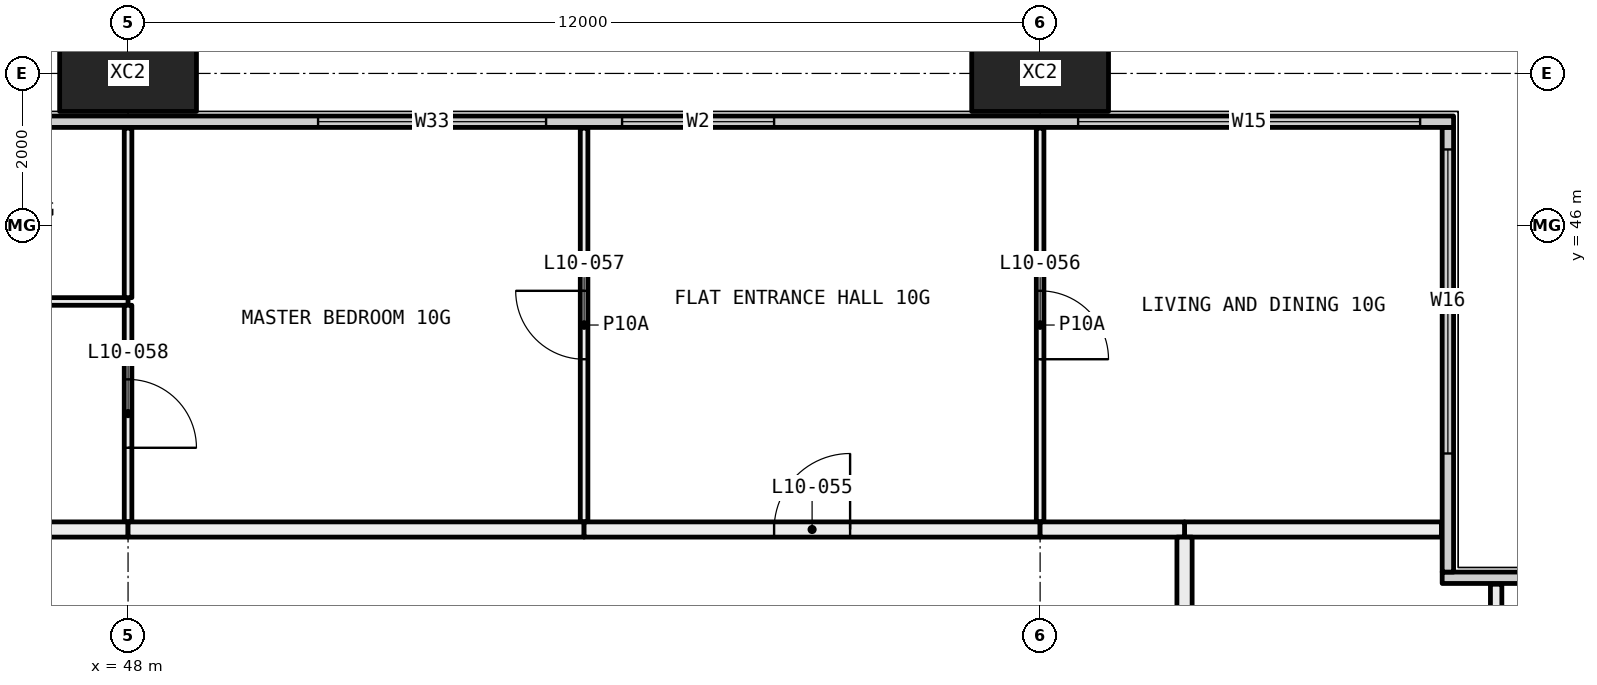
"""IFC4 building model, lengths in metres.
Left out: names, types, materials, properties, quantities, classifications, styles, units other than length and angle.
Written with IfcOpenShell. Run it as: python <this file> out.ifc"""

import sys

from ifc_helpers import new_model, si_unit, direction, frame, frame_2d, origin, origin_2d, place, context, subcontext, project, spatial, rectangle, hollow_rectangle, extrude, element, fill, save


model = new_model("IFC4")
c1 = context("Model", 3, precision=1e-05, world=origin(), true_north=direction((0.0, 1.0)))
c2 = subcontext(c1, "Body", "Model", "MODEL_VIEW")
j1 = project(units=[si_unit("LENGTHUNIT", "METRE"), si_unit("PLANEANGLEUNIT", "RADIAN")], contexts=[c1])
p1 = place(None, origin())
s1 = spatial("IfcSite", under=j1, at=p1, CompositionType="ELEMENT")
p2 = place(p1, origin())
s2 = spatial("IfcBuilding", under=s1, at=p2, CompositionType="ELEMENT")
p3 = place(p2, frame((0.0, 0.0, 47.25)))
s3 = spatial("IfcBuildingStorey", under=s2, at=p3, CompositionType="ELEMENT", Elevation=47.25)
for number, where, z_axis, x_axis in (
    (1, (48.0, 48.0, -0.4), (0.0, 0.0, 1.0), (1.0, 0.0, 0.0)),
    (2, (60.0, 48.0, -0.4), (0.0, 0.0, 1.0), (1.0, 0.0, 0.0)),
):
    element("IfcColumn", number, at=place(p3, frame(where, z_axis=z_axis, x_axis=x_axis)), inside=s3, PredefinedType="COLUMN", context=c2, shape_type="SweptSolid", body=[
        extrude(hollow_rectangle(XDim=1.8, YDim=1.0, WallThickness=0.07, at=origin_2d()), origin(), (0.0, 0.0, 1.0), 3.45),
    ])
p4 = place(p3, frame((65.29, 41.365, 0.0), z_axis=(0.0, 0.0, 1.0), x_axis=(1.0, 0.0, 0.0)))
e3 = element("IfcWall", 3, at=p4, inside=s3, PredefinedType="ELEMENTEDWALL", context=c2, shape_type="SweptSolid", body=[
    extrude(rectangle(XDim=6.15, YDim=0.15, at=frame_2d((3.075, 0.0))), origin(), (0.0, 0.0, 1.0), 3.05),
])
p5 = place(p4, frame((1.71, 0.0, 0.45)))
e4 = element("IfcOpeningElement", 4, at=p5, cuts=e3, PredefinedType="OPENING", context=c2, shape_type="SweptSolid", body=[
    extrude(rectangle(XDim=4.0, YDim=2.55, at=frame_2d((2.0, 1.275))), frame((0.0, 0.085, 0.0), z_axis=(0.0, -1.0, 0.0), x_axis=(1.0, 0.0, 0.0)), (0.0, 0.0, 1.0), 0.17),
])
p6 = place(p3, frame((65.365, 41.44, 0.0), z_axis=(0.0, 0.0, 1.0), x_axis=(0.0, 1.0, 0.0)))
e5 = element("IfcWall", 5, at=p6, inside=s3, PredefinedType="ELEMENTEDWALL", context=c2, shape_type="SweptSolid", body=[
    extrude(rectangle(XDim=5.85, YDim=0.15, at=frame_2d((2.925, 0.0))), origin(), (0.0, 0.0, 1.0), 3.05),
])
p7 = place(p6, frame((1.56, 0.0, 0.45)))
e6 = element("IfcOpeningElement", 6, at=p7, cuts=e5, PredefinedType="OPENING", context=c2, shape_type="SweptSolid", body=[
    extrude(rectangle(XDim=4.0, YDim=2.55, at=frame_2d((2.0, 1.275))), frame((0.0, 0.085, 0.0), z_axis=(0.0, -1.0, 0.0), x_axis=(1.0, 0.0, 0.0)), (0.0, 0.0, 1.0), 0.17),
])
p8 = place(p3, frame((6.56, 47.365, 0.0), z_axis=(0.0, 0.0, 1.0), x_axis=(1.0, 0.0, 0.0)))
e7 = element("IfcWall", 7, at=p8, inside=s3, PredefinedType="ELEMENTEDWALL", context=c2, shape_type="SweptSolid", body=[
    extrude(rectangle(XDim=58.88, YDim=0.15, at=frame_2d((29.44, 0.0))), origin(), (0.0, 0.0, 1.0), 3.05),
])
p9 = place(p8, frame((0.44, 0.0, 0.45)))
e8 = element("IfcOpeningElement", 8, at=p9, cuts=e7, PredefinedType="OPENING", context=c2, shape_type="SweptSolid", body=[
    extrude(rectangle(XDim=4.5, YDim=2.55, at=frame_2d((2.25, 1.275))), frame((0.0, 0.085, 0.0), z_axis=(0.0, -1.0, 0.0), x_axis=(1.0, 0.0, 0.0)), (0.0, 0.0, 1.0), 0.17),
])
p10 = place(p8, frame((7.94, 0.0, 0.45)))
e9 = element("IfcOpeningElement", 9, at=p10, cuts=e7, PredefinedType="OPENING", context=c2, shape_type="SweptSolid", body=[
    extrude(rectangle(XDim=3.0, YDim=2.55, at=frame_2d((1.5, 1.275))), frame((0.0, 0.085, 0.0), z_axis=(0.0, -1.0, 0.0), x_axis=(1.0, 0.0, 0.0)), (0.0, 0.0, 1.0), 0.17),
])
p11 = place(p8, frame((11.94, 0.0, 0.45)))
e10 = element("IfcOpeningElement", 10, at=p11, cuts=e7, PredefinedType="OPENING", context=c2, shape_type="SweptSolid", body=[
    extrude(rectangle(XDim=3.0, YDim=2.55, at=frame_2d((1.5, 1.275))), frame((0.0, 0.085, 0.0), z_axis=(0.0, -1.0, 0.0), x_axis=(1.0, 0.0, 0.0)), (0.0, 0.0, 1.0), 0.17),
])
p12 = place(p8, frame((19.94, 0.0, 0.45)))
e11 = element("IfcOpeningElement", 11, at=p12, cuts=e7, PredefinedType="OPENING", context=c2, shape_type="SweptSolid", body=[
    extrude(rectangle(XDim=3.0, YDim=2.55, at=frame_2d((1.5, 1.275))), frame((0.0, 0.085, 0.0), z_axis=(0.0, -1.0, 0.0), x_axis=(1.0, 0.0, 0.0)), (0.0, 0.0, 1.0), 0.17),
])
p13 = place(p8, frame((23.94, 0.0, 0.45)))
e12 = element("IfcOpeningElement", 12, at=p13, cuts=e7, PredefinedType="OPENING", context=c2, shape_type="SweptSolid", body=[
    extrude(rectangle(XDim=2.0, YDim=2.55, at=frame_2d((1.0, 1.275))), frame((0.0, 0.085, 0.0), z_axis=(0.0, -1.0, 0.0), x_axis=(1.0, 0.0, 0.0)), (0.0, 0.0, 1.0), 0.17),
])
p14 = place(p8, frame((31.94, 0.0, 0.45)))
e13 = element("IfcOpeningElement", 13, at=p14, cuts=e7, PredefinedType="OPENING", context=c2, shape_type="SweptSolid", body=[
    extrude(rectangle(XDim=3.0, YDim=2.55, at=frame_2d((1.5, 1.275))), frame((0.0, 0.085, 0.0), z_axis=(0.0, -1.0, 0.0), x_axis=(1.0, 0.0, 0.0)), (0.0, 0.0, 1.0), 0.17),
])
p15 = place(p8, frame((35.94, 0.0, 0.45)))
e14 = element("IfcOpeningElement", 14, at=p15, cuts=e7, PredefinedType="OPENING", context=c2, shape_type="SweptSolid", body=[
    extrude(rectangle(XDim=3.0, YDim=2.55, at=frame_2d((1.5, 1.275))), frame((0.0, 0.085, 0.0), z_axis=(0.0, -1.0, 0.0), x_axis=(1.0, 0.0, 0.0)), (0.0, 0.0, 1.0), 0.17),
])
p16 = place(p8, frame((43.94, 0.0, 0.45)))
e15 = element("IfcOpeningElement", 15, at=p16, cuts=e7, PredefinedType="OPENING", context=c2, shape_type="SweptSolid", body=[
    extrude(rectangle(XDim=3.0, YDim=2.55, at=frame_2d((1.5, 1.275))), frame((0.0, 0.085, 0.0), z_axis=(0.0, -1.0, 0.0), x_axis=(1.0, 0.0, 0.0)), (0.0, 0.0, 1.0), 0.17),
])
p17 = place(p8, frame((47.94, 0.0, 0.45)))
e16 = element("IfcOpeningElement", 16, at=p17, cuts=e7, PredefinedType="OPENING", context=c2, shape_type="SweptSolid", body=[
    extrude(rectangle(XDim=2.0, YDim=2.55, at=frame_2d((1.0, 1.275))), frame((0.0, 0.085, 0.0), z_axis=(0.0, -1.0, 0.0), x_axis=(1.0, 0.0, 0.0)), (0.0, 0.0, 1.0), 0.17),
])
p18 = place(p8, frame((53.94, 0.0, 0.45)))
e17 = element("IfcOpeningElement", 17, at=p18, cuts=e7, PredefinedType="OPENING", context=c2, shape_type="SweptSolid", body=[
    extrude(rectangle(XDim=4.5, YDim=2.55, at=frame_2d((2.25, 1.275))), frame((0.0, 0.085, 0.0), z_axis=(0.0, -1.0, 0.0), x_axis=(1.0, 0.0, 0.0)), (0.0, 0.0, 1.0), 0.17),
])
p19 = place(p3, frame((48.0, 45.0, 0.0), z_axis=(0.0, 0.0, 1.0), x_axis=(-1.0, 0.0, 0.0)))
e18 = element("IfcWall", 18, at=p19, inside=s3, PredefinedType="PARTITIONING", context=c2, shape_type="SweptSolid", body=[
    extrude(rectangle(XDim=11.925, YDim=0.1, at=frame_2d((5.962, 0.0))), origin(), (0.0, 0.0, 1.0), 2.45),
])
p20 = place(p19, frame((5.512, 0.0, 0.0)))
e19 = element("IfcOpeningElement", 19, at=p20, cuts=e18, PredefinedType="OPENING", context=c2, shape_type="SweptSolid", body=[
    extrude(rectangle(XDim=0.9, YDim=2.1, at=frame_2d((0.45, 1.05))), frame((0.0, 0.06, 0.0), z_axis=(0.0, -1.0, 0.0), x_axis=(1.0, 0.0, 0.0)), (0.0, 0.0, 1.0), 0.12),
])
p21 = place(p3, frame((48.0, 42.1, 0.0), z_axis=(0.0, 0.0, 1.0), x_axis=(0.0, 1.0, 0.0)))
e20 = element("IfcWall", 20, at=p21, inside=s3, PredefinedType="PARTITIONING", context=c2, shape_type="SweptSolid", body=[
    extrude(rectangle(XDim=2.85, YDim=0.1, at=frame_2d((1.425, 0.0))), origin(), (0.0, 0.0, 1.0), 3.05),
])
p22 = place(p21, frame((0.975, 0.0, 0.0)))
e21 = element("IfcOpeningElement", 21, at=p22, cuts=e20, PredefinedType="OPENING", context=c2, shape_type="SweptSolid", body=[
    extrude(rectangle(XDim=0.9, YDim=2.1, at=frame_2d((0.45, 1.05))), frame((0.0, 0.06, 0.0), z_axis=(0.0, -1.0, 0.0), x_axis=(1.0, 0.0, 0.0)), (0.0, 0.0, 1.0), 0.12),
])
p23 = place(p3, frame((46.1, 42.0, 0.0), z_axis=(0.0, 0.0, 1.0), x_axis=(1.0, 0.0, 0.0)))
e22 = element("IfcWall", 22, at=p23, inside=s3, PredefinedType="PARTITIONING", context=c2, shape_type="SweptSolid", body=[
    extrude(rectangle(XDim=1.9, YDim=0.2, at=frame_2d((0.95, 0.0))), origin(), (0.0, 0.0, 1.0), 3.05),
])
p24 = place(p3, frame((48.0, 45.05, 0.0), z_axis=(0.0, 0.0, 1.0), x_axis=(0.0, 1.0, 0.0)))
e23 = element("IfcWall", 23, at=p24, inside=s3, PredefinedType="PARTITIONING", context=c2, shape_type="SweptSolid", body=[
    extrude(rectangle(XDim=2.23, YDim=0.1, at=frame_2d((1.115, 0.0))), origin(), (0.0, 0.0, 1.0), 3.05),
])
p25 = place(p3, frame((54.0, 42.1, 0.0), z_axis=(0.0, 0.0, 1.0), x_axis=(0.0, 1.0, 0.0)))
e24 = element("IfcWall", 24, at=p25, inside=s3, PredefinedType="PARTITIONING", context=c2, shape_type="SweptSolid", body=[
    extrude(rectangle(XDim=5.18, YDim=0.1, at=frame_2d((2.59, 0.0))), origin(), (0.0, 0.0, 1.0), 3.05),
])
p26 = place(p25, frame((2.14, 0.0, 0.0)))
e25 = element("IfcOpeningElement", 25, at=p26, cuts=e24, PredefinedType="OPENING", context=c2, shape_type="SweptSolid", body=[
    extrude(rectangle(XDim=0.9, YDim=2.1, at=frame_2d((0.45, 1.05))), frame((0.0, 0.06, 0.0), z_axis=(0.0, -1.0, 0.0), x_axis=(1.0, 0.0, 0.0)), (0.0, 0.0, 1.0), 0.12),
])
p27 = place(p3, frame((48.0, 42.0, 0.0), z_axis=(0.0, 0.0, 1.0), x_axis=(1.0, 0.0, 0.0)))
e26 = element("IfcWall", 26, at=p27, inside=s3, PredefinedType="PARTITIONING", context=c2, shape_type="SweptSolid", body=[
    extrude(rectangle(XDim=6.0, YDim=0.2, at=frame_2d((3.0, 0.0))), origin(), (0.0, 0.0, 1.0), 3.05),
])
p28 = place(p3, frame((60.0, 42.1, 0.0), z_axis=(0.0, 0.0, 1.0), x_axis=(0.0, 1.0, 0.0)))
e27 = element("IfcWall", 27, at=p28, inside=s3, PredefinedType="PARTITIONING", context=c2, shape_type="SweptSolid", body=[
    extrude(rectangle(XDim=5.18, YDim=0.1, at=frame_2d((2.59, 0.0))), origin(), (0.0, 0.0, 1.0), 3.05),
])
p29 = place(p28, frame((2.14, 0.0, 0.0)))
e28 = element("IfcOpeningElement", 28, at=p29, cuts=e27, PredefinedType="OPENING", context=c2, shape_type="SweptSolid", body=[
    extrude(rectangle(XDim=0.9, YDim=2.1, at=frame_2d((0.45, 1.05))), frame((0.0, 0.06, 0.0), z_axis=(0.0, -1.0, 0.0), x_axis=(1.0, 0.0, 0.0)), (0.0, 0.0, 1.0), 0.12),
])
p30 = place(p3, frame((54.0, 42.0, 0.0), z_axis=(0.0, 0.0, 1.0), x_axis=(1.0, 0.0, 0.0)))
e29 = element("IfcWall", 29, at=p30, inside=s3, PredefinedType="PARTITIONING", context=c2, shape_type="SweptSolid", body=[
    extrude(rectangle(XDim=6.0, YDim=0.2, at=frame_2d((3.0, 0.0))), origin(), (0.0, 0.0, 1.0), 3.05),
])
p31 = place(p30, frame((2.5, 0.0, 0.0)))
e30 = element("IfcOpeningElement", 30, at=p31, cuts=e29, PredefinedType="OPENING", context=c2, shape_type="SweptSolid", body=[
    extrude(rectangle(XDim=1.0, YDim=2.1, at=frame_2d((0.5, 1.05))), frame((0.0, 0.11, 0.0), z_axis=(0.0, -1.0, 0.0), x_axis=(1.0, 0.0, 0.0)), (0.0, 0.0, 1.0), 0.22),
])
p32 = place(p3, frame((61.9, 42.0, 0.0), z_axis=(0.0, 0.0, 1.0), x_axis=(1.0, 0.0, 0.0)))
e31 = element("IfcWall", 31, at=p32, inside=s3, PredefinedType="PARTITIONING", context=c2, shape_type="SweptSolid", body=[
    extrude(rectangle(XDim=3.38, YDim=0.2, at=frame_2d((1.69, 0.0))), origin(), (0.0, 0.0, 1.0), 3.05),
])
p33 = place(p3, frame((60.0, 42.0, 0.0), z_axis=(0.0, 0.0, 1.0), x_axis=(1.0, 0.0, 0.0)))
e32 = element("IfcWall", 32, at=p33, inside=s3, PredefinedType="PARTITIONING", context=c2, shape_type="SweptSolid", body=[
    extrude(rectangle(XDim=1.9, YDim=0.2, at=frame_2d((0.95, 0.0))), origin(), (0.0, 0.0, 1.0), 3.05),
])
p34 = place(p3, frame((66.0, 41.28, 0.0), z_axis=(0.0, 0.0, 1.0), x_axis=(0.0, -1.0, 0.0)))
e33 = element("IfcWall", 33, at=p34, inside=s3, PredefinedType="PARTITIONING", context=c2, shape_type="SweptSolid", body=[
    extrude(rectangle(XDim=3.78, YDim=0.15, at=frame_2d((1.89, 0.0))), origin(), (0.0, 0.0, 1.0), 3.05),
])
p35 = place(p3, frame((61.9, 41.9, 0.0), z_axis=(0.0, 0.0, 1.0), x_axis=(0.0, -1.0, 0.0)))
e34 = element("IfcWall", 34, at=p35, inside=s3, PredefinedType="PARTITIONING", context=c2, shape_type="SweptSolid", body=[
    extrude(rectangle(XDim=4.4, YDim=0.2, at=frame_2d((2.2, 0.0))), origin(), (0.0, 0.0, 1.0), 3.05),
])
p36 = place(p7, origin())
e35 = element("IfcWindow", 35, at=p36, inside=s3, PartitioningType="SINGLE_PANEL", PredefinedType="WINDOW", context=c2, shape_type="SweptSolid", body=[
    extrude(rectangle(XDim=4.0, YDim=2.55, at=frame_2d((2.0, 1.275))), frame((0.0, 0.03, 0.0), z_axis=(0.0, -1.0, 0.0), x_axis=(1.0, 0.0, 0.0)), (0.0, 0.0, 1.0), 0.06),
])
fill(e6, e35)
p37 = place(p16, origin())
e36 = element("IfcWindow", 36, at=p37, inside=s3, PartitioningType="SINGLE_PANEL", PredefinedType="WINDOW", context=c2, shape_type="SweptSolid", body=[
    extrude(rectangle(XDim=3.0, YDim=2.55, at=frame_2d((1.5, 1.275))), frame((0.0, 0.03, 0.0), z_axis=(0.0, -1.0, 0.0), x_axis=(1.0, 0.0, 0.0)), (0.0, 0.0, 1.0), 0.06),
])
fill(e15, e36)
p38 = place(p17, origin())
e37 = element("IfcWindow", 37, at=p38, inside=s3, PartitioningType="SINGLE_PANEL", PredefinedType="WINDOW", context=c2, shape_type="SweptSolid", body=[
    extrude(rectangle(XDim=2.0, YDim=2.55, at=frame_2d((1.0, 1.275))), frame((0.0, 0.03, 0.0), z_axis=(0.0, -1.0, 0.0), x_axis=(1.0, 0.0, 0.0)), (0.0, 0.0, 1.0), 0.06),
])
fill(e16, e37)
p39 = place(p18, origin())
e38 = element("IfcWindow", 38, at=p39, inside=s3, PartitioningType="SINGLE_PANEL", PredefinedType="WINDOW", context=c2, shape_type="SweptSolid", body=[
    extrude(rectangle(XDim=4.5, YDim=2.55, at=frame_2d((2.25, 1.275))), frame((0.0, 0.03, 0.0), z_axis=(0.0, -1.0, 0.0), x_axis=(1.0, 0.0, 0.0)), (0.0, 0.0, 1.0), 0.06),
])
fill(e17, e38)
p40 = place(p31, origin())
e39 = element("IfcDoor", 39, at=p40, inside=s3, OperationType="SINGLE_SWING_LEFT", PredefinedType="DOOR", context=c2, shape_type="SweptSolid", body=[
    extrude(rectangle(XDim=1.0, YDim=2.1, at=frame_2d((0.5, 1.05))), frame((0.0, 0.025, 0.0), z_axis=(0.0, -1.0, 0.0), x_axis=(1.0, 0.0, 0.0)), (0.0, 0.0, 1.0), 0.05),
])
fill(e30, e39)
p41 = place(p29, frame((0.9, 0.0, 0.0), x_axis=(-1.0, 0.0, 0.0)))
e40 = element("IfcDoor", 40, at=p41, inside=s3, OperationType="SINGLE_SWING_LEFT", PredefinedType="DOOR", context=c2, shape_type="SweptSolid", body=[
    extrude(rectangle(XDim=0.9, YDim=2.1, at=frame_2d((0.45, 1.05))), frame((0.0, 0.025, 0.0), z_axis=(0.0, -1.0, 0.0), x_axis=(1.0, 0.0, 0.0)), (0.0, 0.0, 1.0), 0.05),
])
fill(e28, e40)
p42 = place(p26, origin())
e41 = element("IfcDoor", 41, at=p42, inside=s3, OperationType="SINGLE_SWING_LEFT", PredefinedType="DOOR", context=c2, shape_type="SweptSolid", body=[
    extrude(rectangle(XDim=0.9, YDim=2.1, at=frame_2d((0.45, 1.05))), frame((0.0, 0.025, 0.0), z_axis=(0.0, -1.0, 0.0), x_axis=(1.0, 0.0, 0.0)), (0.0, 0.0, 1.0), 0.05),
])
fill(e25, e41)
p43 = place(p22, frame((0.9, 0.0, 0.0), x_axis=(-1.0, 0.0, 0.0)))
e42 = element("IfcDoor", 42, at=p43, inside=s3, OperationType="SINGLE_SWING_LEFT", PredefinedType="DOOR", context=c2, shape_type="SweptSolid", body=[
    extrude(rectangle(XDim=0.9, YDim=2.1, at=frame_2d((0.45, 1.05))), frame((0.0, 0.025, 0.0), z_axis=(0.0, -1.0, 0.0), x_axis=(1.0, 0.0, 0.0)), (0.0, 0.0, 1.0), 0.05),
])
fill(e21, e42)
save(model, sys.argv[1])
